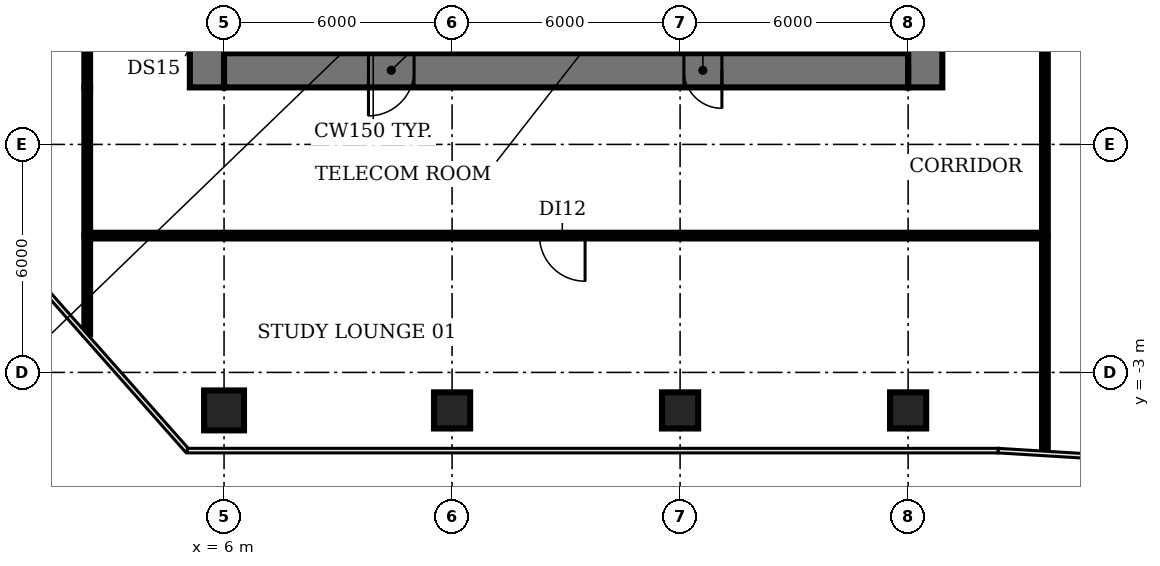
"""IFC4 building model, lengths in metres.
Left out: names, types, materials, properties, quantities, classifications, styles, units other than length and angle.
Written with IfcOpenShell. Run it as: python <this file> out.ifc"""

import sys

from ifc_helpers import new_model, si_unit, direction, frame, frame_2d, origin, origin_2d, place, context, subcontext, project, spatial, rectangle, circle, extrude, element, fill, save


model = new_model("IFC4")
c1 = context("Model", 3, precision=1e-05, world=origin(), true_north=direction((0.0, 1.0)))
c2 = subcontext(c1, "Body", "Model", "MODEL_VIEW")
j1 = project(units=[si_unit("LENGTHUNIT", "METRE"), si_unit("PLANEANGLEUNIT", "RADIAN")], contexts=[c1])
p1 = place(None, origin())
s1 = spatial("IfcSite", under=j1, at=p1, CompositionType="ELEMENT")
p2 = place(p1, origin())
s2 = spatial("IfcBuilding", under=s1, at=p2, CompositionType="ELEMENT")
p3 = place(p2, frame((0.0, 0.0, 37.4)))
s3 = spatial("IfcBuildingStorey", under=s2, at=p3, CompositionType="ELEMENT", Elevation=37.4)
p4 = place(p3, frame((6.0, -4.0, 0.0), z_axis=(0.0, 0.0, 1.0), x_axis=(1.0, 0.0, 0.0)))
e1 = element("IfcColumn", 1, at=p4, inside=s3, PredefinedType="COLUMN", context=c2, shape_type="SweptSolid", body=[
    extrude(circle(Radius=0.525, at=origin_2d()), origin(), (0.0, 0.0, 1.0), 3.85),
])
for number, where, z_axis, x_axis in (
    (2, (12.0, -4.0, 0.0), (0.0, 0.0, 1.0), (1.0, 0.0, 0.0)),
    (3, (18.0, -4.0, 0.0), (0.0, 0.0, 1.0), (1.0, 0.0, 0.0)),
    (4, (24.0, -4.0, 0.0), (0.0, 0.0, 1.0), (1.0, 0.0, 0.0)),
):
    element("IfcColumn", number, at=place(p3, frame(where, z_axis=z_axis, x_axis=x_axis)), inside=s3, PredefinedType="COLUMN", context=c2, shape_type="SweptSolid", body=[
        extrude(rectangle(XDim=0.95, YDim=0.95, at=origin_2d()), origin(), (0.0, 0.0, 1.0), 3.85),
    ])
p5 = place(p3, frame((9.275, 11.825, 0.0), z_axis=(0.0, 0.0, 1.0), x_axis=(0.0, -1.0, 0.0)))
e5 = element("IfcWall", 5, at=p5, inside=s3, PredefinedType="SHEAR", context=c2, shape_type="SweptSolid", body=[
    extrude(rectangle(XDim=6.425, YDim=0.25, at=frame_2d((3.212, 0.0))), origin(), (0.0, 0.0, 1.0), 3.85),
])
p6 = place(p5, frame((5.075, 0.0, 0.0)))
e6 = element("IfcOpeningElement", 6, at=p6, cuts=e5, PredefinedType="OPENING", context=c2, shape_type="SweptSolid", body=[
    extrude(rectangle(XDim=1.0, YDim=2.1, at=frame_2d((0.5, 1.05))), frame((0.0, 0.135, 0.0), z_axis=(0.0, -1.0, 0.0), x_axis=(1.0, 0.0, 0.0)), (0.0, 0.0, 1.0), 0.27),
])
p7 = place(p3, frame((13.5, 5.4, 0.0), z_axis=(0.0, 0.0, 1.0), x_axis=(0.0, 1.0, 0.0)))
e7 = element("IfcWall", 7, at=p7, inside=s3, PredefinedType="SHEAR", context=c2, shape_type="SweptSolid", body=[
    extrude(rectangle(XDim=8.2, YDim=0.2, at=frame_2d((4.1, 0.0))), origin(), (0.0, 0.0, 1.0), 3.85),
])
p8 = place(p7, frame((0.75, 0.0, 0.0)))
e8 = element("IfcOpeningElement", 8, at=p8, cuts=e7, PredefinedType="OPENING", context=c2, shape_type="SweptSolid", body=[
    extrude(rectangle(XDim=1.1, YDim=2.1, at=frame_2d((0.55, 1.05))), frame((0.0, 0.11, 0.0), z_axis=(0.0, -1.0, 0.0), x_axis=(1.0, 0.0, 0.0)), (0.0, 0.0, 1.0), 0.22),
])
p9 = place(p7, frame((3.55, 0.0, 0.0)))
e9 = element("IfcOpeningElement", 9, at=p9, cuts=e7, PredefinedType="OPENING", context=c2, shape_type="SweptSolid", body=[
    extrude(rectangle(XDim=1.1, YDim=2.1, at=frame_2d((0.55, 1.05))), frame((0.0, 0.11, 0.0), z_axis=(0.0, -1.0, 0.0), x_axis=(1.0, 0.0, 0.0)), (0.0, 0.0, 1.0), 0.22),
])
p10 = place(p7, frame((6.35, 0.0, 0.0)))
e10 = element("IfcOpeningElement", 10, at=p10, cuts=e7, PredefinedType="OPENING", context=c2, shape_type="SweptSolid", body=[
    extrude(rectangle(XDim=1.1, YDim=2.1, at=frame_2d((0.55, 1.05))), frame((0.0, 0.11, 0.0), z_axis=(0.0, -1.0, 0.0), x_axis=(1.0, 0.0, 0.0)), (0.0, 0.0, 1.0), 0.22),
])
p11 = place(p3, frame((16.5, 5.4, 0.0), z_axis=(0.0, 0.0, 1.0), x_axis=(0.0, 1.0, 0.0)))
e11 = element("IfcWall", 11, at=p11, inside=s3, PredefinedType="SHEAR", context=c2, shape_type="SweptSolid", body=[
    extrude(rectangle(XDim=8.2, YDim=0.2, at=frame_2d((4.1, 0.0))), origin(), (0.0, 0.0, 1.0), 3.85),
])
p12 = place(p3, frame((20.725, 5.4, 0.0), z_axis=(0.0, 0.0, 1.0), x_axis=(0.0, 1.0, 0.0)))
e12 = element("IfcWall", 12, at=p12, inside=s3, PredefinedType="SHEAR", context=c2, shape_type="SweptSolid", body=[
    extrude(rectangle(XDim=6.3, YDim=0.25, at=frame_2d((3.15, 0.0))), origin(), (0.0, 0.0, 1.0), 3.85),
])
p13 = place(p3, frame((5.55, 4.5, 0.0), z_axis=(0.0, 0.0, 1.0), x_axis=(0.0, 1.0, 0.0)))
e13 = element("IfcWall", 13, at=p13, inside=s3, PredefinedType="SHEAR", context=c2, shape_type="SweptSolid", body=[
    extrude(rectangle(XDim=21.2, YDim=0.9, at=frame_2d((10.6, 0.0))), origin(), (0.0, 0.0, 1.0), 3.85),
])
p14 = place(p13, frame((1.15, 0.0, 0.0)))
e14 = element("IfcOpeningElement", 14, at=p14, cuts=e13, PredefinedType="OPENING", context=c2, shape_type="SweptSolid", body=[
    extrude(rectangle(XDim=1.5, YDim=2.1, at=frame_2d((0.75, 1.05))), frame((0.0, 0.46, 0.0), z_axis=(0.0, -1.0, 0.0), x_axis=(1.0, 0.0, 0.0)), (0.0, 0.0, 1.0), 0.92),
])
p15 = place(p13, frame((7.6, 0.0, 0.0)))
e15 = element("IfcOpeningElement", 15, at=p15, cuts=e13, PredefinedType="OPENING", context=c2, shape_type="SweptSolid", body=[
    extrude(rectangle(XDim=1.2, YDim=2.1, at=frame_2d((0.6, 1.05))), frame((0.0, 0.46, 0.0), z_axis=(0.0, -1.0, 0.0), x_axis=(1.0, 0.0, 0.0)), (0.0, 0.0, 1.0), 0.92),
])
p16 = place(p13, frame((14.15, 0.0, 0.0)))
e16 = element("IfcOpeningElement", 16, at=p16, cuts=e13, PredefinedType="OPENING", context=c2, shape_type="SweptSolid", body=[
    extrude(rectangle(XDim=1.2, YDim=2.1, at=frame_2d((0.6, 1.05))), frame((0.0, 0.46, 0.0), z_axis=(0.0, -1.0, 0.0), x_axis=(1.0, 0.0, 0.0)), (0.0, 0.0, 1.0), 0.92),
])
p17 = place(p3, frame((24.45, 25.7, 0.0), z_axis=(0.0, 0.0, 1.0), x_axis=(0.0, -1.0, 0.0)))
e17 = element("IfcWall", 17, at=p17, inside=s3, PredefinedType="SHEAR", context=c2, shape_type="SweptSolid", body=[
    extrude(rectangle(XDim=21.2, YDim=0.9, at=frame_2d((10.6, 0.0))), origin(), (0.0, 0.0, 1.0), 3.85),
])
p18 = place(p17, frame((18.55, 0.0, 0.0)))
e18 = element("IfcOpeningElement", 18, at=p18, cuts=e17, PredefinedType="OPENING", context=c2, shape_type="SweptSolid", body=[
    extrude(rectangle(XDim=1.5, YDim=2.1, at=frame_2d((0.75, 1.05))), frame((0.0, 0.46, 0.0), z_axis=(0.0, -1.0, 0.0), x_axis=(1.0, 0.0, 0.0)), (0.0, 0.0, 1.0), 0.92),
])
p19 = place(p17, frame((12.45, 0.0, 0.0)))
e19 = element("IfcOpeningElement", 19, at=p19, cuts=e17, PredefinedType="OPENING", context=c2, shape_type="SweptSolid", body=[
    extrude(rectangle(XDim=0.9, YDim=2.1, at=frame_2d((0.45, 1.05))), frame((0.0, 0.46, 0.0), z_axis=(0.0, -1.0, 0.0), x_axis=(1.0, 0.0, 0.0)), (0.0, 0.0, 1.0), 0.92),
])
p20 = place(p17, frame((6.45, 0.0, 0.0)))
e20 = element("IfcOpeningElement", 20, at=p20, cuts=e17, PredefinedType="OPENING", context=c2, shape_type="SweptSolid", body=[
    extrude(rectangle(XDim=2.0, YDim=2.1, at=frame_2d((1.0, 1.05))), frame((0.0, 0.46, 0.0), z_axis=(0.0, -1.0, 0.0), x_axis=(1.0, 0.0, 0.0)), (0.0, 0.0, 1.0), 0.92),
])
p21 = place(p3, frame((24.0, 4.95, 0.0), z_axis=(0.0, 0.0, 1.0), x_axis=(-1.0, 0.0, 0.0)))
e21 = element("IfcWall", 21, at=p21, inside=s3, PredefinedType="SHEAR", context=c2, shape_type="SweptSolid", body=[
    extrude(rectangle(XDim=18.0, YDim=0.9, at=frame_2d((9.0, 0.0))), origin(), (0.0, 0.0, 1.0), 3.85),
])
p22 = place(p21, frame((13.0, 0.0, 0.0)))
e22 = element("IfcOpeningElement", 22, at=p22, cuts=e21, PredefinedType="OPENING", context=c2, shape_type="SweptSolid", body=[
    extrude(rectangle(XDim=1.2, YDim=2.1, at=frame_2d((0.6, 1.05))), frame((0.0, 0.46, 0.0), z_axis=(0.0, -1.0, 0.0), x_axis=(1.0, 0.0, 0.0)), (0.0, 0.0, 1.0), 0.92),
])
p23 = place(p21, frame((4.9, 0.0, 0.0)))
e23 = element("IfcOpeningElement", 23, at=p23, cuts=e21, PredefinedType="OPENING", context=c2, shape_type="SweptSolid", body=[
    extrude(rectangle(XDim=1.0, YDim=2.1, at=frame_2d((0.5, 1.05))), frame((0.0, 0.46, 0.0), z_axis=(0.0, -1.0, 0.0), x_axis=(1.0, 0.0, 0.0)), (0.0, 0.0, 1.0), 0.92),
])
p24 = place(p3, frame((2.4, -1.993, 0.0), z_axis=(0.0, 0.0, 1.0), x_axis=(0.0, 1.0, 0.0)))
e24 = element("IfcWall", 24, at=p24, inside=s3, PredefinedType="PARTITIONING", context=c2, shape_type="SweptSolid", body=[
    extrude(rectangle(XDim=2.593, YDim=0.15, at=frame_2d((1.296, 0.0))), origin(), (0.0, 0.0, 1.0), 2.83),
])
p25 = place(p3, frame((2.4, 0.6, 0.0), z_axis=(0.0, 0.0, 1.0), x_axis=(0.0, 1.0, 0.0)))
e25 = element("IfcWall", 25, at=p25, inside=s3, PredefinedType="PARTITIONING", context=c2, shape_type="SweptSolid", body=[
    extrude(rectangle(XDim=3.9, YDim=0.15, at=frame_2d((1.95, 0.0))), origin(), (0.0, 0.0, 1.0), 2.83),
])
p26 = place(p3, frame((2.4, 4.5, 0.0), z_axis=(0.0, 0.0, 1.0), x_axis=(0.0, 1.0, 0.0)))
e26 = element("IfcWall", 26, at=p26, inside=s3, PredefinedType="PARTITIONING", context=c2, shape_type="SweptSolid", body=[
    extrude(rectangle(XDim=21.2, YDim=0.15, at=frame_2d((10.6, 0.0))), origin(), (0.0, 0.0, 1.0), 2.83),
])
p27 = place(p26, frame((10.8, 0.0, 0.0)))
e27 = element("IfcOpeningElement", 27, at=p27, cuts=e26, PredefinedType="OPENING", context=c2, shape_type="SweptSolid", body=[
    extrude(rectangle(XDim=1.2, YDim=2.1, at=frame_2d((0.6, 1.05))), frame((0.0, 0.085, 0.0), z_axis=(0.0, -1.0, 0.0), x_axis=(1.0, 0.0, 0.0)), (0.0, 0.0, 1.0), 0.17),
])
p28 = place(p3, frame((27.6, -5.08, 0.0), z_axis=(0.0, 0.0, 1.0), x_axis=(0.0, 1.0, 0.0)))
e28 = element("IfcWall", 28, at=p28, inside=s3, PredefinedType="PARTITIONING", context=c2, shape_type="SweptSolid", body=[
    extrude(rectangle(XDim=5.68, YDim=0.15, at=frame_2d((2.84, 0.0))), origin(), (0.0, 0.0, 1.0), 2.83),
])
p29 = place(p3, frame((27.6, 0.6, 0.0), z_axis=(0.0, 0.0, 1.0), x_axis=(-1.0, 0.0, 0.0)))
e29 = element("IfcWall", 29, at=p29, inside=s3, PredefinedType="PARTITIONING", context=c2, shape_type="SweptSolid", body=[
    extrude(rectangle(XDim=25.2, YDim=0.15, at=frame_2d((12.6, 0.0))), origin(), (0.0, 0.0, 1.0), 2.83),
])
p30 = place(p29, frame((12.1, 0.0, 0.0)))
e30 = element("IfcOpeningElement", 30, at=p30, cuts=e29, PredefinedType="OPENING", context=c2, shape_type="SweptSolid", body=[
    extrude(rectangle(XDim=1.2, YDim=2.1, at=frame_2d((0.6, 1.05))), frame((0.0, 0.085, 0.0), z_axis=(0.0, -1.0, 0.0), x_axis=(1.0, 0.0, 0.0)), (0.0, 0.0, 1.0), 0.17),
])
p31 = place(p3, frame((27.6, 0.6, 0.0), z_axis=(0.0, 0.0, 1.0), x_axis=(0.0, 1.0, 0.0)))
e31 = element("IfcWall", 31, at=p31, inside=s3, PredefinedType="PARTITIONING", context=c2, shape_type="SweptSolid", body=[
    extrude(rectangle(XDim=14.4, YDim=0.15, at=frame_2d((7.2, 0.0))), origin(), (0.0, 0.0, 1.0), 2.83),
])
p32 = place(p22, origin())
e32 = element("IfcDoor", 32, at=p32, inside=s3, OperationType="SINGLE_SWING_RIGHT", PredefinedType="DOOR", context=c2, shape_type="SweptSolid", body=[
    extrude(rectangle(XDim=1.2, YDim=2.1, at=frame_2d((0.6, 1.05))), frame((0.0, 0.025, 0.0), z_axis=(0.0, -1.0, 0.0), x_axis=(1.0, 0.0, 0.0)), (0.0, 0.0, 1.0), 0.05),
])
fill(e22, e32)
p33 = place(p23, origin())
e33 = element("IfcDoor", 33, at=p33, inside=s3, OperationType="SINGLE_SWING_LEFT", PredefinedType="DOOR", context=c2, shape_type="SweptSolid", body=[
    extrude(rectangle(XDim=1.0, YDim=2.1, at=frame_2d((0.5, 1.05))), frame((0.0, -0.39, 0.0), z_axis=(0.0, -1.0, 0.0), x_axis=(1.0, 0.0, 0.0)), (0.0, 0.0, 1.0), 0.05),
])
fill(e23, e33)
p34 = place(p30, origin())
e34 = element("IfcDoor", 34, at=p34, inside=s3, OperationType="SINGLE_SWING_LEFT", PredefinedType="DOOR", context=c2, shape_type="SweptSolid", body=[
    extrude(rectangle(XDim=1.2, YDim=2.1, at=frame_2d((0.6, 1.05))), frame((0.0, 0.025, 0.0), z_axis=(0.0, -1.0, 0.0), x_axis=(1.0, 0.0, 0.0)), (0.0, 0.0, 1.0), 0.05),
])
fill(e30, e34)
save(model, sys.argv[1])
